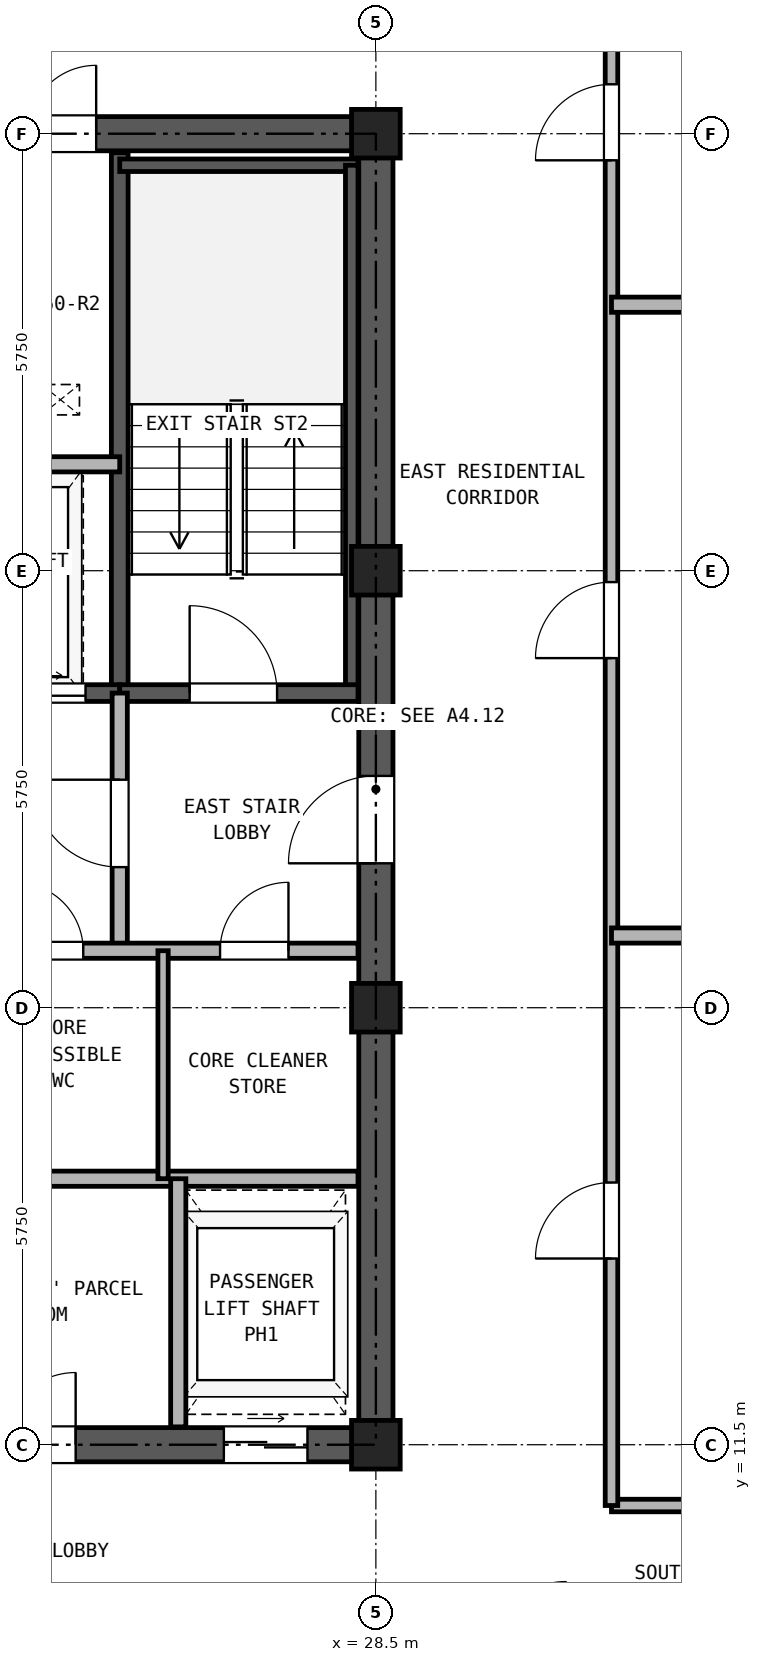
"""IFC4 building model, lengths in metres.
Left out: names, types, materials, properties, quantities, classifications, styles, units other than length and angle.
Written with IfcOpenShell. Run it as: python <this file> out.ifc"""

import sys

from ifc_helpers import new_model, si_unit, direction, frame, frame_2d, origin, origin_2d, place, context, subcontext, project, spatial, rectangle, hollow_rectangle, extrude, source, transform, mapped, element, fill, save


model = new_model("IFC4")
c1 = context("Model", 3, precision=1e-05, world=origin(), true_north=direction((0.0, 1.0)))
c2 = subcontext(c1, "Body", "Model", "MODEL_VIEW")
j1 = project(units=[si_unit("LENGTHUNIT", "METRE"), si_unit("PLANEANGLEUNIT", "RADIAN")], contexts=[c1])
p1 = place(None, origin())
s1 = spatial("IfcSite", under=j1, at=p1, CompositionType="ELEMENT")
p2 = place(p1, origin())
s2 = spatial("IfcBuilding", under=s1, at=p2, CompositionType="ELEMENT")
p3 = place(p2, frame((0.0, 0.0, 178.5)))
s3 = spatial("IfcBuildingStorey", under=s2, at=p3, CompositionType="ELEMENT", Elevation=178.5)
m1 = source(origin(), c2, "Body", "SweptSolid", [
    extrude(hollow_rectangle(XDim=0.64, YDim=0.64, WallThickness=0.035, at=origin_2d()), origin(), (0.0, 0.0, 1.0), 2.95),
])
for number, where, z_axis, x_axis in (
    (1, (28.5, 11.5, 0.0), (0.0, 0.0, 1.0), (1.0, 0.0, 0.0)),
    (2, (28.5, 17.25, 0.0), (0.0, 0.0, 1.0), (1.0, 0.0, 0.0)),
    (3, (28.5, 23.0, 0.0), (0.0, 0.0, 1.0), (1.0, 0.0, 0.0)),
    (4, (28.5, 28.75, 0.0), (0.0, 0.0, 1.0), (1.0, 0.0, 0.0)),
):
    element("IfcColumn", number, at=place(p3, frame(where, z_axis=z_axis, x_axis=x_axis)), inside=s3, PredefinedType="COLUMN", context=c2, shape_type="MappedRepresentation", body=[
        mapped(m1, transform((0.0, 0.0, 0.0), x_axis=(1.0, 0.0, 0.0), y_axis=(0.0, 1.0, 0.0), z_axis=(0.0, 0.0, 1.0), scale=1.0)),
    ])
p4 = place(p3, frame((18.275, 11.5, 0.0), z_axis=(0.0, 0.0, 1.0), x_axis=(1.0, 0.0, 0.0)))
e5 = element("IfcWall", 5, at=p4, inside=s3, PredefinedType="SHEAR", context=c2, shape_type="SweptSolid", body=[
    extrude(rectangle(XDim=10.45, YDim=0.45, at=frame_2d((5.225, 0.0))), origin(), (0.0, 0.0, 1.0), 2.95),
])
p5 = place(p4, frame((1.825, 0.0, 0.0)))
e6 = element("IfcOpeningElement", 6, at=p5, cuts=e5, PredefinedType="OPENING", context=c2, shape_type="SweptSolid", body=[
    extrude(rectangle(XDim=0.95, YDim=2.15, at=frame_2d((0.475, 1.075))), frame((0.0, 0.235, 0.0), z_axis=(0.0, -1.0, 0.0), x_axis=(1.0, 0.0, 0.0)), (0.0, 0.0, 1.0), 0.47),
])
p6 = place(p4, frame((5.325, 0.0, 0.0)))
e7 = element("IfcOpeningElement", 7, at=p6, cuts=e5, PredefinedType="OPENING", context=c2, shape_type="SweptSolid", body=[
    extrude(rectangle(XDim=0.95, YDim=2.15, at=frame_2d((0.475, 1.075))), frame((0.0, 0.235, 0.0), z_axis=(0.0, -1.0, 0.0), x_axis=(1.0, 0.0, 0.0)), (0.0, 0.0, 1.0), 0.47),
])
p7 = place(p4, frame((8.225, 0.0, 0.0)))
e8 = element("IfcOpeningElement", 8, at=p7, cuts=e5, PredefinedType="OPENING", context=c2, shape_type="SweptSolid", body=[
    extrude(rectangle(XDim=1.1, YDim=2.25, at=frame_2d((0.55, 1.125))), frame((0.0, 0.235, 0.0), z_axis=(0.0, -1.0, 0.0), x_axis=(1.0, 0.0, 0.0)), (0.0, 0.0, 1.0), 0.47),
])
p8 = place(p3, frame((18.275, 28.75, 0.0), z_axis=(0.0, 0.0, 1.0), x_axis=(1.0, 0.0, 0.0)))
e9 = element("IfcWall", 9, at=p8, inside=s3, PredefinedType="SHEAR", context=c2, shape_type="SweptSolid", body=[
    extrude(rectangle(XDim=10.45, YDim=0.45, at=frame_2d((5.225, 0.0))), origin(), (0.0, 0.0, 1.0), 2.95),
])
p9 = place(p8, frame((4.105, 0.0, 0.0)))
e10 = element("IfcOpeningElement", 10, at=p9, cuts=e9, PredefinedType="OPENING", context=c2, shape_type="SweptSolid", body=[
    extrude(rectangle(XDim=0.9, YDim=2.05, at=frame_2d((0.45, 1.025))), frame((0.0, 0.235, 0.0), z_axis=(0.0, -1.0, 0.0), x_axis=(1.0, 0.0, 0.0)), (0.0, 0.0, 1.0), 0.47),
])
p10 = place(p8, frame((5.645, 0.0, 0.0)))
e11 = element("IfcOpeningElement", 11, at=p10, cuts=e9, PredefinedType="OPENING", context=c2, shape_type="SweptSolid", body=[
    extrude(rectangle(XDim=0.9, YDim=2.05, at=frame_2d((0.45, 1.025))), frame((0.0, 0.235, 0.0), z_axis=(0.0, -1.0, 0.0), x_axis=(1.0, 0.0, 0.0)), (0.0, 0.0, 1.0), 0.47),
])
p11 = place(p3, frame((28.5, 11.725, 0.0), z_axis=(0.0, 0.0, 1.0), x_axis=(0.0, 1.0, 0.0)))
e12 = element("IfcWall", 12, at=p11, inside=s3, PredefinedType="SHEAR", context=c2, shape_type="SweptSolid", body=[
    extrude(rectangle(XDim=16.8, YDim=0.45, at=frame_2d((8.4, 0.0))), origin(), (0.0, 0.0, 1.0), 2.95),
])
p12 = place(p11, frame((7.425, 0.0, 0.0)))
e13 = element("IfcOpeningElement", 13, at=p12, cuts=e12, PredefinedType="OPENING", context=c2, shape_type="SweptSolid", body=[
    extrude(rectangle(XDim=1.15, YDim=2.2, at=frame_2d((0.575, 1.1))), frame((0.0, 0.235, 0.0), z_axis=(0.0, -1.0, 0.0), x_axis=(1.0, 0.0, 0.0)), (0.0, 0.0, 1.0), 0.47),
])
p13 = place(p3, frame((25.13, 21.39, 0.0), z_axis=(0.0, 0.0, 1.0), x_axis=(0.0, 1.0, 0.0)))
e14 = element("IfcWall", 14, at=p13, inside=s3, PredefinedType="SOLIDWALL", context=c2, shape_type="SweptSolid", body=[
    extrude(rectangle(XDim=7.11, YDim=0.22, at=frame_2d((3.555, 0.0))), origin(), (0.0, 0.0, 1.0), 2.95),
])
p14 = place(p3, frame((25.13, 28.335, 0.0), z_axis=(0.0, 0.0, 1.0), x_axis=(1.0, 0.0, 0.0)))
e15 = element("IfcWall", 15, at=p14, inside=s3, PredefinedType="PARTITIONING", context=c2, shape_type="SweptSolid", body=[
    extrude(rectangle(XDim=3.135, YDim=0.165, at=frame_2d((1.567, 0.0))), origin(), (0.0, 0.0, 1.0), 2.95),
])
p15 = place(p3, frame((28.183, 21.39, 0.0), z_axis=(0.0, 0.0, 1.0), x_axis=(0.0, 1.0, 0.0)))
e16 = element("IfcWall", 16, at=p15, inside=s3, PredefinedType="PARTITIONING", context=c2, shape_type="SweptSolid", body=[
    extrude(rectangle(XDim=6.945, YDim=0.165, at=frame_2d((3.473, 0.0))), origin(), (0.0, 0.0, 1.0), 2.95),
])
p16 = place(p3, frame((18.735, 21.39, 0.0), z_axis=(0.0, 0.0, 1.0), x_axis=(1.0, 0.0, 0.0)))
e17 = element("IfcWall", 17, at=p16, inside=s3, PredefinedType="SOLIDWALL", context=c2, shape_type="SweptSolid", body=[
    extrude(rectangle(XDim=6.395, YDim=0.22, at=frame_2d((3.197, 0.0))), origin(), (0.0, 0.0, 1.0), 2.95),
])
p17 = place(p16, frame((1.115, 0.0, 0.0)))
e18 = element("IfcOpeningElement", 18, at=p17, cuts=e17, PredefinedType="OPENING", context=c2, shape_type="SweptSolid", body=[
    extrude(rectangle(XDim=1.15, YDim=2.2, at=frame_2d((0.575, 1.1))), frame((0.0, 0.12, 0.0), z_axis=(0.0, -1.0, 0.0), x_axis=(1.0, 0.0, 0.0)), (0.0, 0.0, 1.0), 0.24),
])
p18 = place(p16, frame((4.845, 0.0, 0.0)))
e19 = element("IfcOpeningElement", 19, at=p18, cuts=e17, PredefinedType="OPENING", context=c2, shape_type="SweptSolid", body=[
    extrude(rectangle(XDim=1.1, YDim=2.25, at=frame_2d((0.55, 1.125))), frame((0.0, 0.12, 0.0), z_axis=(0.0, -1.0, 0.0), x_axis=(1.0, 0.0, 0.0)), (0.0, 0.0, 1.0), 0.24),
])
p19 = place(p3, frame((25.13, 21.39, 0.0), z_axis=(0.0, 0.0, 1.0), x_axis=(1.0, 0.0, 0.0)))
e20 = element("IfcWall", 20, at=p19, inside=s3, PredefinedType="SOLIDWALL", context=c2, shape_type="SweptSolid", body=[
    extrude(rectangle(XDim=3.135, YDim=0.22, at=frame_2d((1.567, 0.0))), origin(), (0.0, 0.0, 1.0), 2.95),
])
p20 = place(p19, frame((0.92, 0.0, 0.0)))
e21 = element("IfcOpeningElement", 21, at=p20, cuts=e20, PredefinedType="OPENING", context=c2, shape_type="SweptSolid", body=[
    extrude(rectangle(XDim=1.15, YDim=2.2, at=frame_2d((0.575, 1.1))), frame((0.0, 0.12, 0.0), z_axis=(0.0, -1.0, 0.0), x_axis=(1.0, 0.0, 0.0)), (0.0, 0.0, 1.0), 0.24),
])
p21 = place(p3, frame((22.11, 24.4, 0.0), z_axis=(0.0, 0.0, 1.0), x_axis=(1.0, 0.0, 0.0)))
e22 = element("IfcWall", 22, at=p21, inside=s3, PredefinedType="PARTITIONING", context=c2, shape_type="SweptSolid", body=[
    extrude(rectangle(XDim=3.02, YDim=0.2, at=frame_2d((1.51, 0.0))), origin(), (0.0, 0.0, 1.0), 2.95),
])
p22 = place(p3, frame((25.13, 18.0, 0.0), z_axis=(0.0, 0.0, 1.0), x_axis=(0.0, 1.0, 0.0)))
e23 = element("IfcWall", 23, at=p22, inside=s3, PredefinedType="PARTITIONING", context=c2, shape_type="SweptSolid", body=[
    extrude(rectangle(XDim=3.39, YDim=0.2, at=frame_2d((1.695, 0.0))), origin(), (0.0, 0.0, 1.0), 2.95),
])
p23 = place(p22, frame((1.1, 0.0, 0.0)))
e24 = element("IfcOpeningElement", 24, at=p23, cuts=e23, PredefinedType="OPENING", context=c2, shape_type="SweptSolid", body=[
    extrude(rectangle(XDim=1.15, YDim=2.2, at=frame_2d((0.575, 1.1))), frame((0.0, 0.11, 0.0), z_axis=(0.0, -1.0, 0.0), x_axis=(1.0, 0.0, 0.0)), (0.0, 0.0, 1.0), 0.22),
])
p24 = place(p3, frame((18.735, 18.0, 0.0), z_axis=(0.0, 0.0, 1.0), x_axis=(1.0, 0.0, 0.0)))
e25 = element("IfcWall", 25, at=p24, inside=s3, PredefinedType="PARTITIONING", context=c2, shape_type="SweptSolid", body=[
    extrude(rectangle(XDim=9.53, YDim=0.2, at=frame_2d((4.765, 0.0))), origin(), (0.0, 0.0, 1.0), 2.95),
])
p25 = place(p24, frame((0.515, 0.0, 0.0)))
e26 = element("IfcOpeningElement", 26, at=p25, cuts=e25, PredefinedType="OPENING", context=c2, shape_type="SweptSolid", body=[
    extrude(rectangle(XDim=1.3, YDim=2.3, at=frame_2d((0.65, 1.15))), frame((0.0, 0.11, 0.0), z_axis=(0.0, -1.0, 0.0), x_axis=(1.0, 0.0, 0.0)), (0.0, 0.0, 1.0), 0.22),
])
p26 = place(p24, frame((2.615, 0.0, 0.0)))
e27 = element("IfcOpeningElement", 27, at=p26, cuts=e25, PredefinedType="OPENING", context=c2, shape_type="SweptSolid", body=[
    extrude(rectangle(XDim=1.3, YDim=2.3, at=frame_2d((0.65, 1.15))), frame((0.0, 0.11, 0.0), z_axis=(0.0, -1.0, 0.0), x_axis=(1.0, 0.0, 0.0)), (0.0, 0.0, 1.0), 0.22),
])
p27 = place(p24, frame((5.015, 0.0, 0.0)))
e28 = element("IfcOpeningElement", 28, at=p27, cuts=e25, PredefinedType="OPENING", context=c2, shape_type="SweptSolid", body=[
    extrude(rectangle(XDim=0.9, YDim=2.05, at=frame_2d((0.45, 1.025))), frame((0.0, 0.11, 0.0), z_axis=(0.0, -1.0, 0.0), x_axis=(1.0, 0.0, 0.0)), (0.0, 0.0, 1.0), 0.22),
])
p28 = place(p24, frame((7.715, 0.0, 0.0)))
e29 = element("IfcOpeningElement", 29, at=p28, cuts=e25, PredefinedType="OPENING", context=c2, shape_type="SweptSolid", body=[
    extrude(rectangle(XDim=0.9, YDim=2.05, at=frame_2d((0.45, 1.025))), frame((0.0, 0.11, 0.0), z_axis=(0.0, -1.0, 0.0), x_axis=(1.0, 0.0, 0.0)), (0.0, 0.0, 1.0), 0.22),
])
p29 = place(p3, frame((18.735, 15.0, 0.0), z_axis=(0.0, 0.0, 1.0), x_axis=(1.0, 0.0, 0.0)))
e30 = element("IfcWall", 30, at=p29, inside=s3, PredefinedType="PARTITIONING", context=c2, shape_type="SweptSolid", body=[
    extrude(rectangle(XDim=9.53, YDim=0.2, at=frame_2d((4.765, 0.0))), origin(), (0.0, 0.0, 1.0), 2.95),
])
p30 = place(p3, frame((25.7, 15.0, 0.0), z_axis=(0.0, 0.0, 1.0), x_axis=(0.0, 1.0, 0.0)))
e31 = element("IfcWall", 31, at=p30, inside=s3, PredefinedType="PARTITIONING", context=c2, shape_type="SweptSolid", body=[
    extrude(rectangle(XDim=3.0, YDim=0.135, at=frame_2d((1.5, 0.0))), origin(), (0.0, 0.0, 1.0), 2.95),
])
p31 = place(p3, frame((25.9, 11.735, 0.0), z_axis=(0.0, 0.0, 1.0), x_axis=(0.0, 1.0, 0.0)))
e32 = element("IfcWall", 32, at=p31, inside=s3, PredefinedType="PARTITIONING", context=c2, shape_type="SweptSolid", body=[
    extrude(rectangle(XDim=3.265, YDim=0.2, at=frame_2d((1.632, 0.0))), origin(), (0.0, 0.0, 1.0), 2.95),
])
p32 = place(p3, frame((31.6, 10.7, 0.0), z_axis=(0.0, 0.0, 1.0), x_axis=(1.0, 0.0, 0.0)))
e33 = element("IfcWall", 33, at=p32, inside=s3, PredefinedType="PARTITIONING", context=c2, shape_type="SweptSolid", body=[
    extrude(rectangle(XDim=6.6, YDim=0.165, at=frame_2d((3.3, 0.0))), origin(), (0.0, 0.0, 1.0), 2.95),
])
p33 = place(p3, frame((31.6, 10.7, 0.0), z_axis=(0.0, 0.0, 1.0), x_axis=(0.0, 1.0, 0.0)))
e34 = element("IfcWall", 34, at=p33, inside=s3, PredefinedType="PARTITIONING", context=c2, shape_type="SweptSolid", body=[
    extrude(rectangle(XDim=24.44, YDim=0.165, at=frame_2d((12.22, 0.0))), origin(), (0.0, 0.0, 1.0), 2.95),
])
p34 = place(p33, frame((3.25, 0.0, 0.0)))
e35 = element("IfcOpeningElement", 35, at=p34, cuts=e34, PredefinedType="OPENING", context=c2, shape_type="SweptSolid", body=[
    extrude(rectangle(XDim=1.0, YDim=2.15, at=frame_2d((0.5, 1.075))), frame((0.0, 0.093, 0.0), z_axis=(0.0, -1.0, 0.0), x_axis=(1.0, 0.0, 0.0)), (0.0, 0.0, 1.0), 0.185),
])
p35 = place(p33, frame((11.15, 0.0, 0.0)))
e36 = element("IfcOpeningElement", 36, at=p35, cuts=e34, PredefinedType="OPENING", context=c2, shape_type="SweptSolid", body=[
    extrude(rectangle(XDim=1.0, YDim=2.15, at=frame_2d((0.5, 1.075))), frame((0.0, 0.093, 0.0), z_axis=(0.0, -1.0, 0.0), x_axis=(1.0, 0.0, 0.0)), (0.0, 0.0, 1.0), 0.185),
])
p36 = place(p33, frame((17.7, 0.0, 0.0)))
e37 = element("IfcOpeningElement", 37, at=p36, cuts=e34, PredefinedType="OPENING", context=c2, shape_type="SweptSolid", body=[
    extrude(rectangle(XDim=1.0, YDim=2.15, at=frame_2d((0.5, 1.075))), frame((0.0, 0.093, 0.0), z_axis=(0.0, -1.0, 0.0), x_axis=(1.0, 0.0, 0.0)), (0.0, 0.0, 1.0), 0.185),
])
for number, where, z_axis, x_axis in (
    (38, (31.6, 18.2, 0.0), (0.0, 0.0, 1.0), (1.0, 0.0, 0.0)),
    (39, (31.6, 26.5, 0.0), (0.0, 0.0, 1.0), (1.0, 0.0, 0.0)),
):
    element("IfcWall", number, at=place(p3, frame(where, z_axis=z_axis, x_axis=x_axis)), inside=s3, PredefinedType="PARTITIONING", context=c2, shape_type="SweptSolid", body=[
        extrude(rectangle(XDim=10.04, YDim=0.2, at=frame_2d((5.02, 0.0))), origin(), (0.0, 0.0, 1.0), 2.95),
    ])
p37 = place(p20, frame((1.15, 0.0, 0.0), z_axis=(0.0, 0.0, 1.0), x_axis=(-1.0, 0.0, 0.0)))
e40 = element("IfcDoor", 40, at=p37, inside=s3, OperationType="SINGLE_SWING_LEFT", PredefinedType="DOOR", context=c2, shape_type="SweptSolid", body=[
    extrude(rectangle(XDim=1.15, YDim=2.2, at=frame_2d((0.575, 1.1))), frame((0.0, 0.025, 0.0), z_axis=(0.0, -1.0, 0.0), x_axis=(1.0, 0.0, 0.0)), (0.0, 0.0, 1.0), 0.05),
])
fill(e21, e40)
p38 = place(p18, frame((1.1, 0.0, 0.0), z_axis=(0.0, 0.0, 1.0), x_axis=(-1.0, 0.0, 0.0)))
e41 = element("IfcDoor", 41, at=p38, inside=s3, OperationType="DOUBLE_DOOR_SLIDING", PredefinedType="DOOR", context=c2, shape_type="SweptSolid", body=[
    extrude(rectangle(XDim=1.1, YDim=2.25, at=frame_2d((0.55, 1.125))), frame((0.0, 0.025, 0.0), z_axis=(0.0, -1.0, 0.0), x_axis=(1.0, 0.0, 0.0)), (0.0, 0.0, 1.0), 0.05),
])
fill(e19, e41)
p39 = place(p23, origin())
e42 = element("IfcDoor", 42, at=p39, inside=s3, OperationType="SINGLE_SWING_RIGHT", PredefinedType="DOOR", context=c2, shape_type="SweptSolid", body=[
    extrude(rectangle(XDim=1.15, YDim=2.2, at=frame_2d((0.575, 1.1))), frame((0.0, 0.025, 0.0), z_axis=(0.0, -1.0, 0.0), x_axis=(1.0, 0.0, 0.0)), (0.0, 0.0, 1.0), 0.05),
])
fill(e24, e42)
p40 = place(p27, frame((0.9, 0.0, 0.0), z_axis=(0.0, 0.0, 1.0), x_axis=(-1.0, 0.0, 0.0)))
e43 = element("IfcDoor", 43, at=p40, inside=s3, OperationType="SINGLE_SWING_LEFT", PredefinedType="DOOR", context=c2, shape_type="SweptSolid", body=[
    extrude(rectangle(XDim=0.9, YDim=2.05, at=frame_2d((0.45, 1.025))), frame((0.0, 0.025, 0.0), z_axis=(0.0, -1.0, 0.0), x_axis=(1.0, 0.0, 0.0)), (0.0, 0.0, 1.0), 0.05),
])
fill(e28, e43)
p41 = place(p28, frame((0.9, 0.0, 0.0), z_axis=(0.0, 0.0, 1.0), x_axis=(-1.0, 0.0, 0.0)))
e44 = element("IfcDoor", 44, at=p41, inside=s3, OperationType="SINGLE_SWING_RIGHT", PredefinedType="DOOR", context=c2, shape_type="SweptSolid", body=[
    extrude(rectangle(XDim=0.9, YDim=2.05, at=frame_2d((0.45, 1.025))), frame((0.0, 0.025, 0.0), z_axis=(0.0, -1.0, 0.0), x_axis=(1.0, 0.0, 0.0)), (0.0, 0.0, 1.0), 0.05),
])
fill(e29, e44)
p42 = place(p12, origin())
e45 = element("IfcDoor", 45, at=p42, inside=s3, OperationType="SINGLE_SWING_LEFT", PredefinedType="DOOR", context=c2, shape_type="SweptSolid", body=[
    extrude(rectangle(XDim=1.15, YDim=2.2, at=frame_2d((0.575, 1.1))), frame((0.0, 0.025, 0.0), z_axis=(0.0, -1.0, 0.0), x_axis=(1.0, 0.0, 0.0)), (0.0, 0.0, 1.0), 0.05),
])
fill(e13, e45)
p43 = place(p10, origin())
e46 = element("IfcDoor", 46, at=p43, inside=s3, OperationType="SINGLE_SWING_RIGHT", PredefinedType="DOOR", context=c2, shape_type="SweptSolid", body=[
    extrude(rectangle(XDim=0.9, YDim=2.05, at=frame_2d((0.45, 1.025))), frame((0.0, 0.025, 0.0), z_axis=(0.0, -1.0, 0.0), x_axis=(1.0, 0.0, 0.0)), (0.0, 0.0, 1.0), 0.05),
])
fill(e11, e46)
p44 = place(p6, frame((0.95, 0.0, 0.0), z_axis=(0.0, 0.0, 1.0), x_axis=(-1.0, 0.0, 0.0)))
e47 = element("IfcDoor", 47, at=p44, inside=s3, OperationType="SINGLE_SWING_RIGHT", PredefinedType="DOOR", context=c2, shape_type="SweptSolid", body=[
    extrude(rectangle(XDim=0.95, YDim=2.15, at=frame_2d((0.475, 1.075))), frame((0.0, 0.025, 0.0), z_axis=(0.0, -1.0, 0.0), x_axis=(1.0, 0.0, 0.0)), (0.0, 0.0, 1.0), 0.05),
])
fill(e7, e47)
p45 = place(p7, frame((1.1, 0.0, 0.0), z_axis=(0.0, 0.0, 1.0), x_axis=(-1.0, 0.0, 0.0)))
e48 = element("IfcDoor", 48, at=p45, inside=s3, OperationType="DOUBLE_DOOR_SLIDING", PredefinedType="DOOR", context=c2, shape_type="SweptSolid", body=[
    extrude(rectangle(XDim=1.1, YDim=2.25, at=frame_2d((0.55, 1.125))), frame((0.0, 0.025, 0.0), z_axis=(0.0, -1.0, 0.0), x_axis=(1.0, 0.0, 0.0)), (0.0, 0.0, 1.0), 0.05),
])
fill(e8, e48)
p46 = place(p34, frame((1.0, 0.0, 0.0), z_axis=(0.0, 0.0, 1.0), x_axis=(-1.0, 0.0, 0.0)))
e49 = element("IfcDoor", 49, at=p46, inside=s3, OperationType="SINGLE_SWING_LEFT", PredefinedType="DOOR", context=c2, shape_type="SweptSolid", body=[
    extrude(rectangle(XDim=1.0, YDim=2.15, at=frame_2d((0.5, 1.075))), frame((0.0, 0.025, 0.0), z_axis=(0.0, -1.0, 0.0), x_axis=(1.0, 0.0, 0.0)), (0.0, 0.0, 1.0), 0.05),
])
fill(e35, e49)
p47 = place(p35, frame((1.0, 0.0, 0.0), z_axis=(0.0, 0.0, 1.0), x_axis=(-1.0, 0.0, 0.0)))
e50 = element("IfcDoor", 50, at=p47, inside=s3, OperationType="SINGLE_SWING_LEFT", PredefinedType="DOOR", context=c2, shape_type="SweptSolid", body=[
    extrude(rectangle(XDim=1.0, YDim=2.15, at=frame_2d((0.5, 1.075))), frame((0.0, 0.025, 0.0), z_axis=(0.0, -1.0, 0.0), x_axis=(1.0, 0.0, 0.0)), (0.0, 0.0, 1.0), 0.05),
])
fill(e36, e50)
p48 = place(p36, frame((1.0, 0.0, 0.0), z_axis=(0.0, 0.0, 1.0), x_axis=(-1.0, 0.0, 0.0)))
e51 = element("IfcDoor", 51, at=p48, inside=s3, OperationType="SINGLE_SWING_LEFT", PredefinedType="DOOR", context=c2, shape_type="SweptSolid", body=[
    extrude(rectangle(XDim=1.0, YDim=2.15, at=frame_2d((0.5, 1.075))), frame((0.0, 0.025, 0.0), z_axis=(0.0, -1.0, 0.0), x_axis=(1.0, 0.0, 0.0)), (0.0, 0.0, 1.0), 0.05),
])
fill(e37, e51)
save(model, sys.argv[1])
